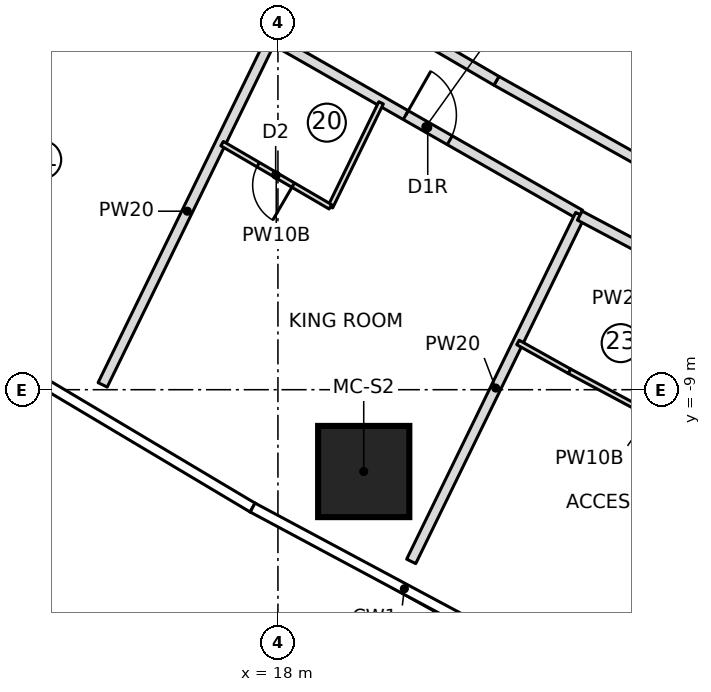
"""IFC4 building model, lengths in metres.
Left out: names, types, materials, properties, quantities, classifications, styles, units other than length and angle.
Written with IfcOpenShell. Run it as: python <this file> out.ifc"""

import sys

from ifc_helpers import new_model, si_unit, direction, frame, frame_2d, origin, origin_2d, place, context, subcontext, project, spatial, rectangle, extrude, element, fill, save


model = new_model("IFC4")
c1 = context("Model", 3, precision=1e-05, world=origin(), true_north=direction((0.0, 1.0)))
c2 = subcontext(c1, "Body", "Model", "MODEL_VIEW")
j1 = project(units=[si_unit("LENGTHUNIT", "METRE"), si_unit("PLANEANGLEUNIT", "RADIAN")], contexts=[c1])
p1 = place(None, origin())
s1 = spatial("IfcSite", under=j1, at=p1, CompositionType="ELEMENT")
p2 = place(p1, origin())
s2 = spatial("IfcBuilding", under=s1, at=p2, CompositionType="ELEMENT")
p3 = place(p2, frame((0.0, 0.0, 68.0)))
s3 = spatial("IfcBuildingStorey", under=s2, at=p3, CompositionType="ELEMENT", Elevation=68.0)
p4 = place(p3, frame((19.693, -10.615, 0.0), z_axis=(0.0, 0.0, 1.0), x_axis=(1.0, 0.0, 0.0)))
e1 = element("IfcColumn", 1, at=p4, inside=s3, PredefinedType="COLUMN", context=c2, shape_type="SweptSolid", body=[
    extrude(rectangle(XDim=1.8, YDim=1.8, at=origin_2d()), origin(), (0.0, 0.0, 1.0), 3.55),
])
p5 = place(p3, frame((14.541, -8.904, 0.0), z_axis=(0.0, 0.0, 1.0), x_axis=(0.438213564788, 0.898870887078, 0.0)))
e2 = element("IfcWall", 2, at=p5, inside=s3, PredefinedType="PARTITIONING", context=c2, shape_type="SweptSolid", body=[
    extrude(rectangle(XDim=7.625, YDim=0.2, at=frame_2d((3.813, 0.0))), origin(), (0.0, 0.0, 1.0), 3.25),
])
p6 = place(p3, frame((17.874, -2.068, 0.0), z_axis=(0.0, 0.0, 1.0), x_axis=(0.868427275315, -0.495816566373, 0.0)))
e3 = element("IfcWall", 3, at=p6, inside=s3, PredefinedType="PARTITIONING", context=c2, shape_type="SweptSolid", body=[
    extrude(rectangle(XDim=7.015, YDim=0.2, at=frame_2d((3.507, 0.0))), origin(), (0.0, 0.0, 1.0), 3.25),
])
p7 = place(p6, frame((3.05, 0.0, 0.0)))
e4 = element("IfcOpeningElement", 4, at=p7, cuts=e3, PredefinedType="OPENING", context=c2, shape_type="SweptSolid", body=[
    extrude(rectangle(XDim=1.0, YDim=2.1, at=frame_2d((0.5, 1.05))), frame((0.0, 0.11, 0.0), z_axis=(0.0, -1.0, 0.0), x_axis=(1.0, 0.0, 0.0)), (0.0, 0.0, 1.0), 0.22),
])
p8 = place(p3, frame((20.035, -3.338, 0.0), z_axis=(0.0, 0.0, 1.0), x_axis=(-0.438122322582, -0.898915363344, 0.0)))
e5 = element("IfcWall", 5, at=p8, inside=s3, PredefinedType="PARTITIONING", context=c2, shape_type="SweptSolid", body=[
    extrude(rectangle(XDim=2.283, YDim=0.1, at=frame_2d((1.142, 0.0))), origin(), (0.0, 0.0, 1.0), 3.25),
])
p9 = place(p3, frame((19.035, -5.39, 0.0), z_axis=(0.0, 0.0, 1.0), x_axis=(-0.863707305865, 0.503993739837, 0.0)))
e6 = element("IfcWall", 6, at=p9, inside=s3, PredefinedType="PARTITIONING", context=c2, shape_type="SweptSolid", body=[
    extrude(rectangle(XDim=2.474, YDim=0.1, at=frame_2d((1.237, 0.0))), origin(), (0.0, 0.0, 1.0), 3.25),
])
p10 = place(p9, frame((0.85, 0.0, 0.0)))
e7 = element("IfcOpeningElement", 7, at=p10, cuts=e6, PredefinedType="OPENING", context=c2, shape_type="SweptSolid", body=[
    extrude(rectangle(XDim=0.8, YDim=2.1, at=frame_2d((0.4, 1.05))), frame((0.0, 0.06, 0.0), z_axis=(0.0, -1.0, 0.0), x_axis=(1.0, 0.0, 0.0)), (0.0, 0.0, 1.0), 0.12),
])
p11 = place(p3, frame((20.63, -12.388, 0.0), z_axis=(0.0, 0.0, 1.0), x_axis=(0.438184754816, 0.898884931816, 0.0)))
e8 = element("IfcWall", 8, at=p11, inside=s3, PredefinedType="PARTITIONING", context=c2, shape_type="SweptSolid", body=[
    extrude(rectangle(XDim=7.612, YDim=0.2, at=frame_2d((3.806, 0.0))), origin(), (0.0, 0.0, 1.0), 3.25),
])
p12 = place(p3, frame((23.957, -5.564, 0.0), z_axis=(0.0, 0.0, 1.0), x_axis=(0.883455325405, -0.468515408513, 0.0)))
e9 = element("IfcWall", 9, at=p12, inside=s3, PredefinedType="PARTITIONING", context=c2, shape_type="SweptSolid", body=[
    extrude(rectangle(XDim=7.004, YDim=0.2, at=frame_2d((3.502, 0.0))), origin(), (0.0, 0.0, 1.0), 3.25),
])
p13 = place(p12, frame((3.7, 0.0, 0.0)))
e10 = element("IfcOpeningElement", 10, at=p13, cuts=e9, PredefinedType="OPENING", context=c2, shape_type="SweptSolid", body=[
    extrude(rectangle(XDim=1.0, YDim=2.1, at=frame_2d((0.5, 1.05))), frame((0.0, 0.11, 0.0), z_axis=(0.0, -1.0, 0.0), x_axis=(1.0, 0.0, 0.0)), (0.0, 0.0, 1.0), 0.22),
])
p14 = place(p3, frame((25.55, -9.597, 0.0), z_axis=(0.0, 0.0, 1.0), x_axis=(-0.881675736231, 0.471855800156, 0.0)))
e11 = element("IfcWall", 11, at=p14, inside=s3, PredefinedType="PARTITIONING", context=c2, shape_type="SweptSolid", body=[
    extrude(rectangle(XDim=2.039, YDim=0.1, at=frame_2d((1.019, 0.0))), origin(), (0.0, 0.0, 1.0), 3.25),
])
p15 = place(p3, frame((23.753, -8.635, 0.0), z_axis=(0.0, 0.0, 1.0), x_axis=(-0.872799020153, 0.488079778745, 0.0)))
e12 = element("IfcWall", 12, at=p15, inside=s3, PredefinedType="PARTITIONING", context=c2, shape_type="SweptSolid", body=[
    extrude(rectangle(XDim=1.165, YDim=0.1, at=frame_2d((0.582, 0.0))), origin(), (0.0, 0.0, 1.0), 3.25),
])
p16 = place(p3, frame((25.817, -4.863, 0.0), z_axis=(0.0, 0.0, 1.0), x_axis=(-0.872800289292, 0.488077509225, 0.0)))
e13 = element("IfcWall", 13, at=p16, inside=s3, PredefinedType="PARTITIONING", context=c2, shape_type="SweptSolid", body=[
    extrude(rectangle(XDim=4.016, YDim=0.2, at=frame_2d((2.008, 0.0))), origin(), (0.0, 0.0, 1.0), 3.25),
])
p17 = place(p3, frame((22.312, -2.903, 0.0), z_axis=(0.0, 0.0, 1.0), x_axis=(-0.863710538269, 0.503988200341, 0.0)))
e14 = element("IfcWall", 14, at=p17, inside=s3, PredefinedType="PARTITIONING", context=c2, shape_type="SweptSolid", body=[
    extrude(rectangle(XDim=4.016, YDim=0.2, at=frame_2d((2.008, 0.0))), origin(), (0.0, 0.0, 1.0), 3.25),
])
p18 = place(p10, origin())
e15 = element("IfcDoor", 15, at=p18, inside=s3, OperationType="SINGLE_SWING_LEFT", PredefinedType="DOOR", context=c2, shape_type="SweptSolid", body=[
    extrude(rectangle(XDim=0.8, YDim=2.1, at=frame_2d((0.4, 1.05))), frame((0.0, 0.025, 0.0), z_axis=(0.0, -1.0, 0.0), x_axis=(1.0, 0.0, 0.0)), (0.0, 0.0, 1.0), 0.05),
])
fill(e7, e15)
p19 = place(p7, origin())
e16 = element("IfcDoor", 16, at=p19, inside=s3, OperationType="SINGLE_SWING_RIGHT", PredefinedType="DOOR", context=c2, shape_type="SweptSolid", body=[
    extrude(rectangle(XDim=1.0, YDim=2.1, at=frame_2d((0.5, 1.05))), frame((0.0, 0.025, 0.0), z_axis=(0.0, -1.0, 0.0), x_axis=(1.0, 0.0, 0.0)), (0.0, 0.0, 1.0), 0.05),
])
fill(e4, e16)
save(model, sys.argv[1])
